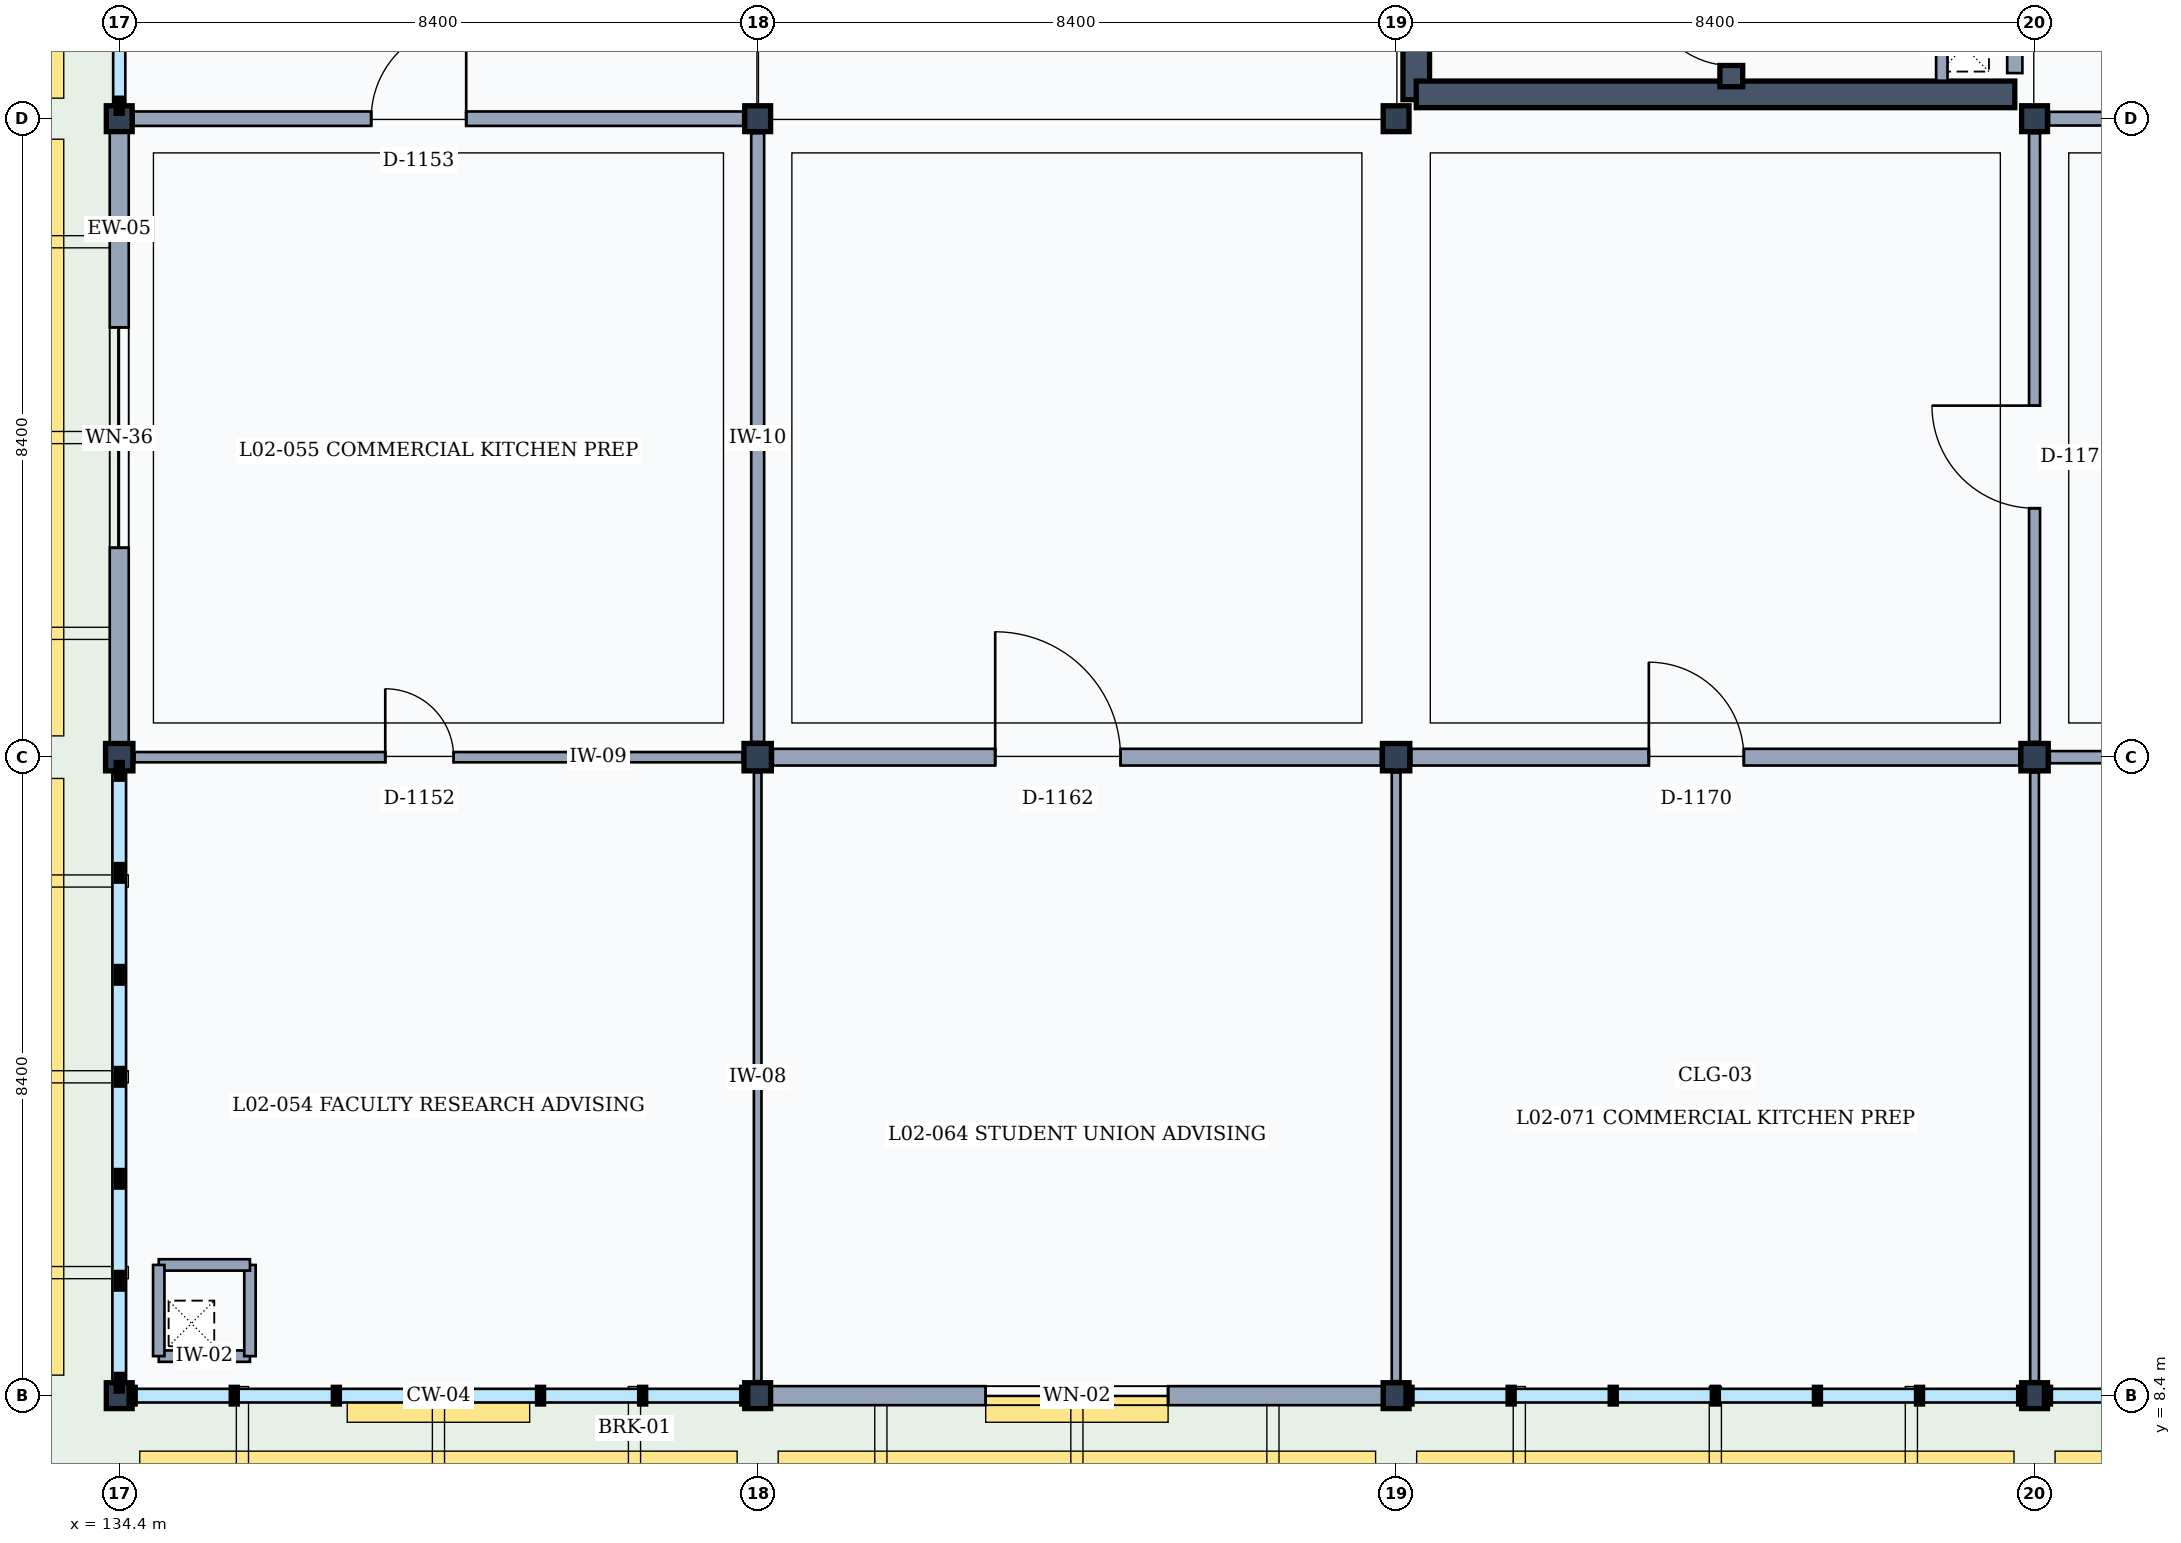
"""IFC4 building model, lengths in metres.
Left out: names, types, materials, properties, quantities, classifications, styles, units other than length and angle.
Written with IfcOpenShell. Run it as: python <this file> out.ifc"""

import sys

from ifc_helpers import new_model, si_unit, direction, frame, frame_2d, origin, origin_2d, place, context, subcontext, project, spatial, rectangle, extrude, element, fill, save


model = new_model("IFC4")
c1 = context("Model", 3, precision=1e-05, world=origin(), true_north=direction((0.0, 1.0)))
c2 = subcontext(c1, "Body", "Model", "MODEL_VIEW")
j1 = project(units=[si_unit("LENGTHUNIT", "METRE"), si_unit("PLANEANGLEUNIT", "RADIAN")], contexts=[c1])
p1 = place(None, origin())
s1 = spatial("IfcSite", under=j1, at=p1, CompositionType="ELEMENT")
p2 = place(p1, origin())
s2 = spatial("IfcBuilding", under=s1, at=p2, CompositionType="ELEMENT")
p3 = place(p2, frame((0.0, 0.0, 9.6)))
s3 = spatial("IfcBuildingStorey", under=s2, at=p3, CompositionType="ELEMENT", Elevation=9.6)
p4 = place(p3, frame((134.4, 8.4, 0.0), z_axis=(0.0, 0.0, 1.0), x_axis=(1.0, 0.0, 0.0)))
e1 = element("IfcColumn", 1, at=p4, inside=s3, PredefinedType="COLUMN", context=c2, shape_type="SweptSolid", body=[
    extrude(rectangle(XDim=0.34, YDim=0.34, at=origin_2d()), origin(), (0.0, 0.0, 1.0), 4.2),
])
p5 = place(p3, frame((134.4, 16.8, 0.0), z_axis=(0.0, 0.0, 1.0), x_axis=(1.0, 0.0, 0.0)))
e2 = element("IfcColumn", 2, at=p5, inside=s3, PredefinedType="COLUMN", context=c2, shape_type="SweptSolid", body=[
    extrude(rectangle(XDim=0.36, YDim=0.36, at=origin_2d()), origin(), (0.0, 0.0, 1.0), 4.2),
])
for number, where, z_axis, x_axis in (
    (3, (134.4, 25.2, 0.0), (0.0, 0.0, 1.0), (1.0, 0.0, 0.0)),
    (4, (142.8, 8.4, 0.0), (0.0, 0.0, 1.0), (1.0, 0.0, 0.0)),
):
    element("IfcColumn", number, at=place(p3, frame(where, z_axis=z_axis, x_axis=x_axis)), inside=s3, PredefinedType="COLUMN", context=c2, shape_type="SweptSolid", body=[
        extrude(rectangle(XDim=0.34, YDim=0.34, at=origin_2d()), origin(), (0.0, 0.0, 1.0), 4.2),
    ])
p6 = place(p3, frame((142.8, 16.8, 0.0), z_axis=(0.0, 0.0, 1.0), x_axis=(1.0, 0.0, 0.0)))
e5 = element("IfcColumn", 5, at=p6, inside=s3, PredefinedType="COLUMN", context=c2, shape_type="SweptSolid", body=[
    extrude(rectangle(XDim=0.36, YDim=0.36, at=origin_2d()), origin(), (0.0, 0.0, 1.0), 4.2),
])
for number, where, z_axis, x_axis in (
    (6, (142.8, 25.2, 0.0), (0.0, 0.0, 1.0), (1.0, 0.0, 0.0)),
    (7, (151.2, 8.4, 0.0), (0.0, 0.0, 1.0), (1.0, 0.0, 0.0)),
):
    element("IfcColumn", number, at=place(p3, frame(where, z_axis=z_axis, x_axis=x_axis)), inside=s3, PredefinedType="COLUMN", context=c2, shape_type="SweptSolid", body=[
        extrude(rectangle(XDim=0.34, YDim=0.34, at=origin_2d()), origin(), (0.0, 0.0, 1.0), 4.2),
    ])
p7 = place(p3, frame((151.2, 16.8, 0.0), z_axis=(0.0, 0.0, 1.0), x_axis=(1.0, 0.0, 0.0)))
e8 = element("IfcColumn", 8, at=p7, inside=s3, PredefinedType="COLUMN", context=c2, shape_type="SweptSolid", body=[
    extrude(rectangle(XDim=0.36, YDim=0.36, at=origin_2d()), origin(), (0.0, 0.0, 1.0), 4.2),
])
for number, where, z_axis, x_axis in (
    (9, (151.2, 25.2, 0.0), (0.0, 0.0, 1.0), (1.0, 0.0, 0.0)),
    (10, (159.6, 8.4, 0.0), (0.0, 0.0, 1.0), (1.0, 0.0, 0.0)),
):
    element("IfcColumn", number, at=place(p3, frame(where, z_axis=z_axis, x_axis=x_axis)), inside=s3, PredefinedType="COLUMN", context=c2, shape_type="SweptSolid", body=[
        extrude(rectangle(XDim=0.34, YDim=0.34, at=origin_2d()), origin(), (0.0, 0.0, 1.0), 4.2),
    ])
p8 = place(p3, frame((159.6, 16.8, 0.0), z_axis=(0.0, 0.0, 1.0), x_axis=(1.0, 0.0, 0.0)))
e11 = element("IfcColumn", 11, at=p8, inside=s3, PredefinedType="COLUMN", context=c2, shape_type="SweptSolid", body=[
    extrude(rectangle(XDim=0.36, YDim=0.36, at=origin_2d()), origin(), (0.0, 0.0, 1.0), 4.2),
])
p9 = place(p3, frame((159.6, 25.2, 0.0), z_axis=(0.0, 0.0, 1.0), x_axis=(1.0, 0.0, 0.0)))
e12 = element("IfcColumn", 12, at=p9, inside=s3, PredefinedType="COLUMN", context=c2, shape_type="SweptSolid", body=[
    extrude(rectangle(XDim=0.34, YDim=0.34, at=origin_2d()), origin(), (0.0, 0.0, 1.0), 4.2),
])
p10 = place(p3, frame((134.4, 16.98, 0.0), z_axis=(0.0, 0.0, 1.0), x_axis=(0.0, 1.0, 0.0)))
e13 = element("IfcWall", 13, at=p10, inside=s3, PredefinedType="SOLIDWALL", context=c2, shape_type="SweptSolid", body=[
    extrude(rectangle(XDim=8.05, YDim=0.25, at=frame_2d((4.025, 0.0))), origin(), (0.0, 0.0, 1.0), 3.36),
])
p11 = place(p10, frame((2.575, 0.0, 0.9)))
e14 = element("IfcOpeningElement", 14, at=p11, cuts=e13, PredefinedType="OPENING", context=c2, shape_type="SweptSolid", body=[
    extrude(rectangle(XDim=2.9, YDim=1.75, at=frame_2d((1.45, 0.875))), frame((0.0, 0.135, 0.0), z_axis=(0.0, -1.0, 0.0), x_axis=(1.0, 0.0, 0.0)), (0.0, 0.0, 1.0), 0.27),
])
p12 = place(p3, frame((151.03, 8.4, 0.0), z_axis=(0.0, 0.0, 1.0), x_axis=(-1.0, 0.0, 0.0)))
e15 = element("IfcWall", 15, at=p12, inside=s3, PredefinedType="SOLIDWALL", context=c2, shape_type="SweptSolid", body=[
    extrude(rectangle(XDim=8.06, YDim=0.25, at=frame_2d((4.03, 0.0))), origin(), (0.0, 0.0, 1.0), 3.36),
])
p13 = place(p12, frame((2.83, 0.0, 0.9)))
e16 = element("IfcOpeningElement", 16, at=p13, cuts=e15, PredefinedType="OPENING", context=c2, shape_type="SweptSolid", body=[
    extrude(rectangle(XDim=2.4, YDim=1.8, at=frame_2d((1.2, 0.9))), frame((0.0, 0.135, 0.0), z_axis=(0.0, -1.0, 0.0), x_axis=(1.0, 0.0, 0.0)), (0.0, 0.0, 1.0), 0.27),
])
p14 = place(p3, frame((151.465, 25.45, 0.0), z_axis=(0.0, 0.0, 1.0), x_axis=(0.0, 1.0, 0.0)))
e17 = element("IfcWall", 17, at=p14, inside=s3, PredefinedType="SHEAR", context=c2, shape_type="SweptSolid", body=[
    extrude(rectangle(XDim=7.94, YDim=0.35, at=frame_2d((3.97, 0.0))), origin(), (0.0, 0.0, 1.0), 3.95),
])
p15 = place(p3, frame((159.34, 33.0, 0.0), z_axis=(0.0, 0.0, 1.0), x_axis=(0.0, -1.0, 0.0)))
e18 = element("IfcWall", 18, at=p15, inside=s3, PredefinedType="PARTITIONING", context=c2, shape_type="SweptSolid", body=[
    extrude(rectangle(XDim=7.2, YDim=0.2, at=frame_2d((3.6, 0.0))), origin(), (0.0, 0.0, 1.0), 3.32),
])
p16 = place(p15, frame((3.55, 0.0, 0.0)))
e19 = element("IfcOpeningElement", 19, at=p16, cuts=e18, PredefinedType="OPENING", context=c2, shape_type="SweptSolid", body=[
    extrude(rectangle(XDim=1.1, YDim=2.15, at=frame_2d((0.55, 1.075))), frame((0.0, 0.11, 0.0), z_axis=(0.0, -1.0, 0.0), x_axis=(1.0, 0.0, 0.0)), (0.0, 0.0, 1.0), 0.22),
])
p17 = place(p3, frame((159.34, 25.52, 0.0), z_axis=(0.0, 0.0, 1.0), x_axis=(-1.0, 0.0, 0.0)))
e20 = element("IfcWall", 20, at=p17, inside=s3, PredefinedType="SHEAR", context=c2, shape_type="SweptSolid", body=[
    extrude(rectangle(XDim=7.875, YDim=0.35, at=frame_2d((3.938, 0.0))), origin(), (0.0, 0.0, 1.0), 3.95),
])
p18 = place(p3, frame((155.61, 25.62, 0.0), z_axis=(0.0, 0.0, 1.0), x_axis=(0.0, 1.0, 0.0)))
e21 = element("IfcWall", 21, at=p18, inside=s3, PredefinedType="SHEAR", context=c2, shape_type="SweptSolid", body=[
    extrude(rectangle(XDim=7.38, YDim=0.3, at=frame_2d((3.69, 0.0))), origin(), (0.0, 0.0, 1.0), 3.95),
])
p19 = place(p18, frame((0.28, 0.0, 0.0)))
e22 = element("IfcOpeningElement", 22, at=p19, cuts=e21, PredefinedType="OPENING", context=c2, shape_type="SweptSolid", body=[
    extrude(rectangle(XDim=1.1, YDim=2.15, at=frame_2d((0.55, 1.075))), frame((0.0, 0.16, 0.0), z_axis=(0.0, -1.0, 0.0), x_axis=(1.0, 0.0, 0.0)), (0.0, 0.0, 1.0), 0.32),
])
p20 = place(p3, frame((158.38, 26.76, 0.0), z_axis=(0.0, 0.0, 1.0), x_axis=(0.0, -1.0, 0.0)))
e23 = element("IfcWall", 23, at=p20, inside=s3, PredefinedType="PARTITIONING", context=c2, shape_type="SweptSolid", body=[
    extrude(rectangle(XDim=1.06, YDim=0.15, at=frame_2d((0.53, 0.0))), origin(), (0.0, 0.0, 1.0), 3.32),
])
for number, where, z_axis, x_axis in (
    (24, (134.92, 8.92, 0.0), (0.0, 0.0, 1.0), (1.0, 0.0, 0.0)),
    (25, (136.12, 8.92, 0.0), (0.0, 0.0, 1.0), (0.0, 1.0, 0.0)),
    (26, (136.12, 10.12, 0.0), (0.0, 0.0, 1.0), (-1.0, 0.0, 0.0)),
    (27, (134.92, 10.12, 0.0), (0.0, 0.0, 1.0), (0.0, -1.0, 0.0)),
):
    element("IfcWall", number, at=place(p3, frame(where, z_axis=z_axis, x_axis=x_axis)), inside=s3, PredefinedType="PARTITIONING", context=c2, shape_type="SweptSolid", body=[
        extrude(rectangle(XDim=1.2, YDim=0.15, at=frame_2d((0.6, 0.0))), origin(), (0.0, 0.0, 1.0), 3.95),
    ])
p21 = place(p3, frame((142.8, 8.59, 0.0), z_axis=(0.0, 0.0, 1.0), x_axis=(0.0, 1.0, 0.0)))
e28 = element("IfcWall", 28, at=p21, inside=s3, PredefinedType="MOVABLE", context=c2, shape_type="SweptSolid", body=[
    extrude(rectangle(XDim=8.01, YDim=0.1, at=frame_2d((4.005, 0.0))), origin(), (0.0, 0.0, 1.0), 3.32),
])
p22 = place(p3, frame((134.6, 16.8, 0.0), z_axis=(0.0, 0.0, 1.0), x_axis=(1.0, 0.0, 0.0)))
e29 = element("IfcWall", 29, at=p22, inside=s3, PredefinedType="PARTITIONING", context=c2, shape_type="SweptSolid", body=[
    extrude(rectangle(XDim=8.0, YDim=0.135, at=frame_2d((4.0, 0.0))), origin(), (0.0, 0.0, 1.0), 3.32),
])
p23 = place(p22, frame((3.3, 0.0, 0.0)))
e30 = element("IfcOpeningElement", 30, at=p23, cuts=e29, PredefinedType="OPENING", context=c2, shape_type="SweptSolid", body=[
    extrude(rectangle(XDim=0.9, YDim=2.1, at=frame_2d((0.45, 1.05))), frame((0.0, 0.077, 0.0), z_axis=(0.0, -1.0, 0.0), x_axis=(1.0, 0.0, 0.0)), (0.0, 0.0, 1.0), 0.155),
])
p24 = place(p3, frame((142.8, 17.0, 0.0), z_axis=(0.0, 0.0, 1.0), x_axis=(0.0, 1.0, 0.0)))
e31 = element("IfcWall", 31, at=p24, inside=s3, PredefinedType="PARTITIONING", context=c2, shape_type="SweptSolid", body=[
    extrude(rectangle(XDim=8.01, YDim=0.17, at=frame_2d((4.005, 0.0))), origin(), (0.0, 0.0, 1.0), 3.32),
])
p25 = place(p3, frame((134.59, 25.2, 0.0), z_axis=(0.0, 0.0, 1.0), x_axis=(1.0, 0.0, 0.0)))
e32 = element("IfcWall", 32, at=p25, inside=s3, PredefinedType="PARTITIONING", context=c2, shape_type="SweptSolid", body=[
    extrude(rectangle(XDim=8.02, YDim=0.19, at=frame_2d((4.01, 0.0))), origin(), (0.0, 0.0, 1.0), 3.32),
])
p26 = place(p25, frame((3.125, 0.0, 0.0)))
e33 = element("IfcOpeningElement", 33, at=p26, cuts=e32, PredefinedType="OPENING", context=c2, shape_type="SweptSolid", body=[
    extrude(rectangle(XDim=1.25, YDim=2.3, at=frame_2d((0.625, 1.15))), frame((0.0, 0.105, 0.0), z_axis=(0.0, -1.0, 0.0), x_axis=(1.0, 0.0, 0.0)), (0.0, 0.0, 1.0), 0.21),
])
p27 = place(p3, frame((151.2, 8.59, 0.0), z_axis=(0.0, 0.0, 1.0), x_axis=(0.0, 1.0, 0.0)))
e34 = element("IfcWall", 34, at=p27, inside=s3, PredefinedType="PARTITIONING", context=c2, shape_type="SweptSolid", body=[
    extrude(rectangle(XDim=8.01, YDim=0.115, at=frame_2d((4.005, 0.0))), origin(), (0.0, 0.0, 1.0), 3.32),
])
p28 = place(p3, frame((143.0, 16.8, 0.0), z_axis=(0.0, 0.0, 1.0), x_axis=(1.0, 0.0, 0.0)))
e35 = element("IfcWall", 35, at=p28, inside=s3, PredefinedType="PARTITIONING", context=c2, shape_type="SweptSolid", body=[
    extrude(rectangle(XDim=8.0, YDim=0.22, at=frame_2d((4.0, 0.0))), origin(), (0.0, 0.0, 1.0), 3.32),
])
p29 = place(p28, frame((2.925, 0.0, 0.0)))
e36 = element("IfcOpeningElement", 36, at=p29, cuts=e35, PredefinedType="OPENING", context=c2, shape_type="SweptSolid", body=[
    extrude(rectangle(XDim=1.65, YDim=2.25, at=frame_2d((0.825, 1.125))), frame((0.0, 0.12, 0.0), z_axis=(0.0, -1.0, 0.0), x_axis=(1.0, 0.0, 0.0)), (0.0, 0.0, 1.0), 0.24),
])
p30 = place(p3, frame((159.6, 8.59, 0.0), z_axis=(0.0, 0.0, 1.0), x_axis=(0.0, 1.0, 0.0)))
e37 = element("IfcWall", 37, at=p30, inside=s3, PredefinedType="PARTITIONING", context=c2, shape_type="SweptSolid", body=[
    extrude(rectangle(XDim=8.01, YDim=0.115, at=frame_2d((4.005, 0.0))), origin(), (0.0, 0.0, 1.0), 3.32),
])
p31 = place(p3, frame((151.4, 16.8, 0.0), z_axis=(0.0, 0.0, 1.0), x_axis=(1.0, 0.0, 0.0)))
e38 = element("IfcWall", 38, at=p31, inside=s3, PredefinedType="PARTITIONING", context=c2, shape_type="SweptSolid", body=[
    extrude(rectangle(XDim=8.0, YDim=0.22, at=frame_2d((4.0, 0.0))), origin(), (0.0, 0.0, 1.0), 3.32),
])
p32 = place(p31, frame((3.125, 0.0, 0.0)))
e39 = element("IfcOpeningElement", 39, at=p32, cuts=e38, PredefinedType="OPENING", context=c2, shape_type="SweptSolid", body=[
    extrude(rectangle(XDim=1.25, YDim=2.3, at=frame_2d((0.625, 1.15))), frame((0.0, 0.12, 0.0), z_axis=(0.0, -1.0, 0.0), x_axis=(1.0, 0.0, 0.0)), (0.0, 0.0, 1.0), 0.24),
])
p33 = place(p3, frame((159.6, 17.0, 0.0), z_axis=(0.0, 0.0, 1.0), x_axis=(0.0, 1.0, 0.0)))
e40 = element("IfcWall", 40, at=p33, inside=s3, PredefinedType="PARTITIONING", context=c2, shape_type="SweptSolid", body=[
    extrude(rectangle(XDim=8.01, YDim=0.145, at=frame_2d((4.005, 0.0))), origin(), (0.0, 0.0, 1.0), 3.32),
])
p34 = place(p33, frame((3.075, 0.0, 0.0)))
e41 = element("IfcOpeningElement", 41, at=p34, cuts=e40, PredefinedType="OPENING", context=c2, shape_type="SweptSolid", body=[
    extrude(rectangle(XDim=1.35, YDim=2.25, at=frame_2d((0.675, 1.125))), frame((0.0, 0.083, 0.0), z_axis=(0.0, -1.0, 0.0), x_axis=(1.0, 0.0, 0.0)), (0.0, 0.0, 1.0), 0.165),
])
p35 = place(p3, frame((159.8, 16.8, 0.0), z_axis=(0.0, 0.0, 1.0), x_axis=(1.0, 0.0, 0.0)))
e42 = element("IfcWall", 42, at=p35, inside=s3, PredefinedType="PARTITIONING", context=c2, shape_type="SweptSolid", body=[
    extrude(rectangle(XDim=8.0, YDim=0.16, at=frame_2d((4.0, 0.0))), origin(), (0.0, 0.0, 1.0), 3.32),
])
p36 = place(p35, frame((3.05, 0.0, 0.0)))
e43 = element("IfcOpeningElement", 43, at=p36, cuts=e42, PredefinedType="OPENING", context=c2, shape_type="SweptSolid", body=[
    extrude(rectangle(XDim=1.4, YDim=2.25, at=frame_2d((0.7, 1.125))), frame((0.0, 0.09, 0.0), z_axis=(0.0, -1.0, 0.0), x_axis=(1.0, 0.0, 0.0)), (0.0, 0.0, 1.0), 0.18),
])
p37 = place(p3, frame((159.79, 25.2, 0.0), z_axis=(0.0, 0.0, 1.0), x_axis=(1.0, 0.0, 0.0)))
e44 = element("IfcWall", 44, at=p37, inside=s3, PredefinedType="PARTITIONING", context=c2, shape_type="SweptSolid", body=[
    extrude(rectangle(XDim=8.02, YDim=0.18, at=frame_2d((4.01, 0.0))), origin(), (0.0, 0.0, 1.0), 3.32),
])
p38 = place(p11, origin())
e45 = element("IfcWindow", 45, at=p38, inside=s3, PartitioningType="SINGLE_PANEL", PredefinedType="WINDOW", context=c2, shape_type="SweptSolid", body=[
    extrude(rectangle(XDim=2.9, YDim=1.75, at=frame_2d((1.45, 0.875))), frame((0.0, 0.03, 0.0), z_axis=(0.0, -1.0, 0.0), x_axis=(1.0, 0.0, 0.0)), (0.0, 0.0, 1.0), 0.06),
])
fill(e14, e45)
p39 = place(p13, origin())
e46 = element("IfcWindow", 46, at=p39, inside=s3, PartitioningType="SINGLE_PANEL", PredefinedType="WINDOW", context=c2, shape_type="SweptSolid", body=[
    extrude(rectangle(XDim=2.4, YDim=1.8, at=frame_2d((1.2, 0.9))), frame((0.0, 0.03, 0.0), z_axis=(0.0, -1.0, 0.0), x_axis=(1.0, 0.0, 0.0)), (0.0, 0.0, 1.0), 0.06),
])
fill(e16, e46)
p40 = place(p19, origin())
e47 = element("IfcDoor", 47, at=p40, inside=s3, OperationType="SINGLE_SWING_RIGHT", PredefinedType="DOOR", context=c2, shape_type="SweptSolid", body=[
    extrude(rectangle(XDim=1.1, YDim=2.15, at=frame_2d((0.55, 1.075))), frame((0.0, 0.025, 0.0), z_axis=(0.0, -1.0, 0.0), x_axis=(1.0, 0.0, 0.0)), (0.0, 0.0, 1.0), 0.05),
])
fill(e22, e47)
p41 = place(p23, origin())
e48 = element("IfcDoor", 48, at=p41, inside=s3, OperationType="SINGLE_SWING_LEFT", PredefinedType="DOOR", context=c2, shape_type="SweptSolid", body=[
    extrude(rectangle(XDim=0.9, YDim=2.1, at=frame_2d((0.45, 1.05))), frame((0.0, 0.025, 0.0), z_axis=(0.0, -1.0, 0.0), x_axis=(1.0, 0.0, 0.0)), (0.0, 0.0, 1.0), 0.05),
])
fill(e30, e48)
p42 = place(p26, origin())
e49 = element("IfcDoor", 49, at=p42, inside=s3, OperationType="SINGLE_SWING_RIGHT", PredefinedType="DOOR", context=c2, shape_type="SweptSolid", body=[
    extrude(rectangle(XDim=1.25, YDim=2.3, at=frame_2d((0.625, 1.15))), frame((0.0, 0.025, 0.0), z_axis=(0.0, -1.0, 0.0), x_axis=(1.0, 0.0, 0.0)), (0.0, 0.0, 1.0), 0.05),
])
fill(e33, e49)
p43 = place(p29, origin())
e50 = element("IfcDoor", 50, at=p43, inside=s3, OperationType="SINGLE_SWING_LEFT", PredefinedType="DOOR", context=c2, shape_type="SweptSolid", body=[
    extrude(rectangle(XDim=1.65, YDim=2.25, at=frame_2d((0.825, 1.125))), frame((0.0, 0.025, 0.0), z_axis=(0.0, -1.0, 0.0), x_axis=(1.0, 0.0, 0.0)), (0.0, 0.0, 1.0), 0.05),
])
fill(e36, e50)
p44 = place(p32, origin())
e51 = element("IfcDoor", 51, at=p44, inside=s3, OperationType="SINGLE_SWING_LEFT", PredefinedType="DOOR", context=c2, shape_type="SweptSolid", body=[
    extrude(rectangle(XDim=1.25, YDim=2.3, at=frame_2d((0.625, 1.15))), frame((0.0, 0.025, 0.0), z_axis=(0.0, -1.0, 0.0), x_axis=(1.0, 0.0, 0.0)), (0.0, 0.0, 1.0), 0.05),
])
fill(e39, e51)
p45 = place(p34, origin())
e52 = element("IfcDoor", 52, at=p45, inside=s3, OperationType="SINGLE_SWING_RIGHT", PredefinedType="DOOR", context=c2, shape_type="SweptSolid", body=[
    extrude(rectangle(XDim=1.35, YDim=2.25, at=frame_2d((0.675, 1.125))), frame((0.0, 0.025, 0.0), z_axis=(0.0, -1.0, 0.0), x_axis=(1.0, 0.0, 0.0)), (0.0, 0.0, 1.0), 0.05),
])
fill(e41, e52)
save(model, sys.argv[1])
